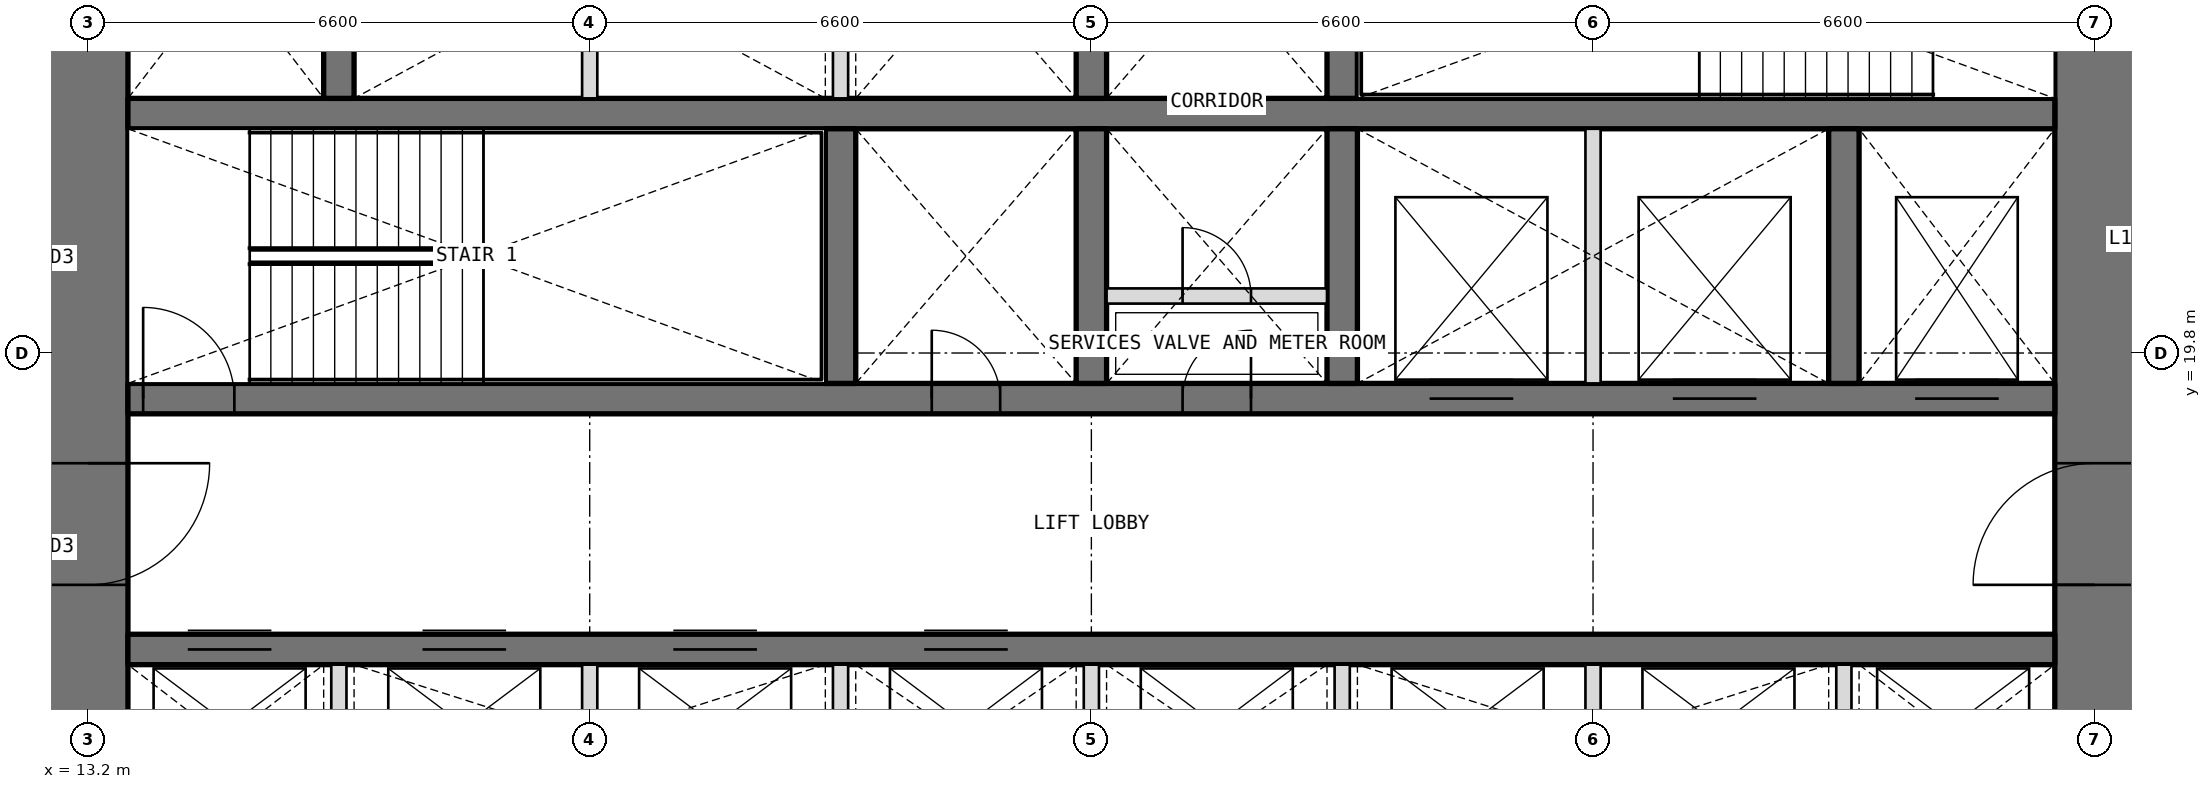
"""IFC4 building model, lengths in metres.
Left out: names, types, materials, properties, quantities, classifications, styles, units other than length and angle.
Written with IfcOpenShell. Run it as: python <this file> out.ifc"""

import sys

from ifc_helpers import new_model, si_unit, direction, frame, frame_2d, origin, place, context, subcontext, project, spatial, rectangle, extrude, element, fill, save


model = new_model("IFC4")
c1 = context("Model", 3, precision=1e-05, world=origin(), true_north=direction((0.0, 1.0)))
c2 = subcontext(c1, "Body", "Model", "MODEL_VIEW")
j1 = project(units=[si_unit("LENGTHUNIT", "METRE"), si_unit("PLANEANGLEUNIT", "RADIAN")], contexts=[c1])
p1 = place(None, origin())
s1 = spatial("IfcSite", under=j1, at=p1, CompositionType="ELEMENT")
p2 = place(p1, origin())
s2 = spatial("IfcBuilding", under=s1, at=p2, CompositionType="ELEMENT")
p3 = place(p2, frame((0.0, 0.0, 63.3)))
s3 = spatial("IfcBuildingStorey", under=s2, at=p3, CompositionType="ELEMENT", Elevation=63.3)
p4 = place(p3, frame((39.6, 13.725, 0.0), z_axis=(0.0, 0.0, 1.0), x_axis=(0.0, 1.0, 0.0)))
e1 = element("IfcWall", 1, at=p4, inside=s3, PredefinedType="SHEAR", context=c2, shape_type="SweptSolid", body=[
    extrude(rectangle(XDim=18.75, YDim=1.05, at=frame_2d((9.375, 0.0))), origin(), (0.0, 0.0, 1.0), 4.2),
])
p5 = place(p4, frame((3.025, 0.0, 0.0)))
e2 = element("IfcOpeningElement", 2, at=p5, cuts=e1, PredefinedType="OPENING", context=c2, shape_type="SweptSolid", body=[
    extrude(rectangle(XDim=1.6, YDim=2.1, at=frame_2d((0.8, 1.05))), frame((0.0, 0.535, 0.0), z_axis=(0.0, -1.0, 0.0), x_axis=(1.0, 0.0, 0.0)), (0.0, 0.0, 1.0), 1.07),
])
p6 = place(p4, frame((13.825, 0.0, 0.0)))
e3 = element("IfcOpeningElement", 3, at=p6, cuts=e1, PredefinedType="OPENING", context=c2, shape_type="SweptSolid", body=[
    extrude(rectangle(XDim=1.6, YDim=2.1, at=frame_2d((0.8, 1.05))), frame((0.0, 0.535, 0.0), z_axis=(0.0, -1.0, 0.0), x_axis=(1.0, 0.0, 0.0)), (0.0, 0.0, 1.0), 1.07),
])
p7 = place(p3, frame((13.2, 32.475, 0.0), z_axis=(0.0, 0.0, 1.0), x_axis=(0.0, -1.0, 0.0)))
e4 = element("IfcWall", 4, at=p7, inside=s3, PredefinedType="SHEAR", context=c2, shape_type="SweptSolid", body=[
    extrude(rectangle(XDim=18.75, YDim=1.05, at=frame_2d((9.375, 0.0))), origin(), (0.0, 0.0, 1.0), 4.2),
])
p8 = place(p7, frame((14.125, 0.0, 0.0)))
e5 = element("IfcOpeningElement", 5, at=p8, cuts=e4, PredefinedType="OPENING", context=c2, shape_type="SweptSolid", body=[
    extrude(rectangle(XDim=1.6, YDim=2.1, at=frame_2d((0.8, 1.05))), frame((0.0, 0.535, 0.0), z_axis=(0.0, -1.0, 0.0), x_axis=(1.0, 0.0, 0.0)), (0.0, 0.0, 1.0), 1.07),
])
p9 = place(p7, frame((3.325, 0.0, 0.0)))
e6 = element("IfcOpeningElement", 6, at=p9, cuts=e4, PredefinedType="OPENING", context=c2, shape_type="SweptSolid", body=[
    extrude(rectangle(XDim=1.6, YDim=2.1, at=frame_2d((0.8, 1.05))), frame((0.0, 0.535, 0.0), z_axis=(0.0, -1.0, 0.0), x_axis=(1.0, 0.0, 0.0)), (0.0, 0.0, 1.0), 1.07),
])
p10 = place(p3, frame((13.725, 15.9, 0.0), z_axis=(0.0, 0.0, 1.0), x_axis=(1.0, 0.0, 0.0)))
e7 = element("IfcWall", 7, at=p10, inside=s3, PredefinedType="SHEAR", context=c2, shape_type="SweptSolid", body=[
    extrude(rectangle(XDim=25.35, YDim=0.4, at=frame_2d((12.675, 0.0))), origin(), (0.0, 0.0, 1.0), 4.2),
])
p11 = place(p10, frame((0.788, 0.0, 0.0)))
e8 = element("IfcOpeningElement", 8, at=p11, cuts=e7, PredefinedType="OPENING", context=c2, shape_type="SweptSolid", body=[
    extrude(rectangle(XDim=1.1, YDim=2.1, at=frame_2d((0.55, 1.05))), frame((0.0, 0.21, 0.0), z_axis=(0.0, -1.0, 0.0), x_axis=(1.0, 0.0, 0.0)), (0.0, 0.0, 1.0), 0.42),
])
p12 = place(p10, frame((3.875, 0.0, 0.0)))
e9 = element("IfcOpeningElement", 9, at=p12, cuts=e7, PredefinedType="OPENING", context=c2, shape_type="SweptSolid", body=[
    extrude(rectangle(XDim=1.1, YDim=2.1, at=frame_2d((0.55, 1.05))), frame((0.0, 0.21, 0.0), z_axis=(0.0, -1.0, 0.0), x_axis=(1.0, 0.0, 0.0)), (0.0, 0.0, 1.0), 0.42),
])
p13 = place(p10, frame((7.175, 0.0, 0.0)))
e10 = element("IfcOpeningElement", 10, at=p13, cuts=e7, PredefinedType="OPENING", context=c2, shape_type="SweptSolid", body=[
    extrude(rectangle(XDim=1.1, YDim=2.1, at=frame_2d((0.55, 1.05))), frame((0.0, 0.21, 0.0), z_axis=(0.0, -1.0, 0.0), x_axis=(1.0, 0.0, 0.0)), (0.0, 0.0, 1.0), 0.42),
])
p14 = place(p10, frame((10.475, 0.0, 0.0)))
e11 = element("IfcOpeningElement", 11, at=p14, cuts=e7, PredefinedType="OPENING", context=c2, shape_type="SweptSolid", body=[
    extrude(rectangle(XDim=1.1, YDim=2.1, at=frame_2d((0.55, 1.05))), frame((0.0, 0.21, 0.0), z_axis=(0.0, -1.0, 0.0), x_axis=(1.0, 0.0, 0.0)), (0.0, 0.0, 1.0), 0.42),
])
p15 = place(p3, frame((13.725, 19.2, 0.0), z_axis=(0.0, 0.0, 1.0), x_axis=(1.0, 0.0, 0.0)))
e12 = element("IfcWall", 12, at=p15, inside=s3, PredefinedType="SHEAR", context=c2, shape_type="SweptSolid", body=[
    extrude(rectangle(XDim=25.35, YDim=0.4, at=frame_2d((12.675, 0.0))), origin(), (0.0, 0.0, 1.0), 4.2),
])
p16 = place(p15, frame((10.575, 0.0, 0.0)))
e13 = element("IfcOpeningElement", 13, at=p16, cuts=e12, PredefinedType="OPENING", context=c2, shape_type="SweptSolid", body=[
    extrude(rectangle(XDim=0.9, YDim=2.1, at=frame_2d((0.45, 1.05))), frame((0.0, 0.21, 0.0), z_axis=(0.0, -1.0, 0.0), x_axis=(1.0, 0.0, 0.0)), (0.0, 0.0, 1.0), 0.42),
])
p17 = place(p15, frame((13.875, 0.0, 0.0)))
e14 = element("IfcOpeningElement", 14, at=p17, cuts=e12, PredefinedType="OPENING", context=c2, shape_type="SweptSolid", body=[
    extrude(rectangle(XDim=0.9, YDim=2.1, at=frame_2d((0.45, 1.05))), frame((0.0, 0.21, 0.0), z_axis=(0.0, -1.0, 0.0), x_axis=(1.0, 0.0, 0.0)), (0.0, 0.0, 1.0), 0.42),
])
p18 = place(p15, frame((0.2, 0.0, 0.0)))
e15 = element("IfcOpeningElement", 15, at=p18, cuts=e12, PredefinedType="OPENING", context=c2, shape_type="SweptSolid", body=[
    extrude(rectangle(XDim=1.2, YDim=2.1, at=frame_2d((0.6, 1.05))), frame((0.0, 0.21, 0.0), z_axis=(0.0, -1.0, 0.0), x_axis=(1.0, 0.0, 0.0)), (0.0, 0.0, 1.0), 0.42),
])
p19 = place(p15, frame((23.512, 0.0, 0.0)))
e16 = element("IfcOpeningElement", 16, at=p19, cuts=e12, PredefinedType="OPENING", context=c2, shape_type="SweptSolid", body=[
    extrude(rectangle(XDim=1.1, YDim=2.1, at=frame_2d((0.55, 1.05))), frame((0.0, 0.21, 0.0), z_axis=(0.0, -1.0, 0.0), x_axis=(1.0, 0.0, 0.0)), (0.0, 0.0, 1.0), 0.42),
])
p20 = place(p15, frame((17.125, 0.0, 0.0)))
e17 = element("IfcOpeningElement", 17, at=p20, cuts=e12, PredefinedType="OPENING", context=c2, shape_type="SweptSolid", body=[
    extrude(rectangle(XDim=1.1, YDim=2.1, at=frame_2d((0.55, 1.05))), frame((0.0, 0.21, 0.0), z_axis=(0.0, -1.0, 0.0), x_axis=(1.0, 0.0, 0.0)), (0.0, 0.0, 1.0), 0.42),
])
p21 = place(p15, frame((20.325, 0.0, 0.0)))
e18 = element("IfcOpeningElement", 18, at=p21, cuts=e12, PredefinedType="OPENING", context=c2, shape_type="SweptSolid", body=[
    extrude(rectangle(XDim=1.1, YDim=2.1, at=frame_2d((0.55, 1.05))), frame((0.0, 0.21, 0.0), z_axis=(0.0, -1.0, 0.0), x_axis=(1.0, 0.0, 0.0)), (0.0, 0.0, 1.0), 0.42),
])
p22 = place(p3, frame((13.725, 22.95, 0.0), z_axis=(0.0, 0.0, 1.0), x_axis=(1.0, 0.0, 0.0)))
e19 = element("IfcWall", 19, at=p22, inside=s3, PredefinedType="SHEAR", context=c2, shape_type="SweptSolid", body=[
    extrude(rectangle(XDim=25.35, YDim=0.4, at=frame_2d((12.675, 0.0))), origin(), (0.0, 0.0, 1.0), 4.2),
])
for number, where, z_axis, x_axis in (
    (20, (23.1, 19.4, 0.0), (0.0, 0.0, 1.0), (0.0, 1.0, 0.0)),
    (21, (26.4, 19.4, 0.0), (0.0, 0.0, 1.0), (0.0, 1.0, 0.0)),
    (22, (29.7, 19.4, 0.0), (0.0, 0.0, 1.0), (0.0, 1.0, 0.0)),
    (23, (36.3, 19.4, 0.0), (0.0, 0.0, 1.0), (0.0, 1.0, 0.0)),
    (24, (16.5, 23.15, 0.0), (0.0, 0.0, 1.0), (0.0, 1.0, 0.0)),
    (25, (26.4, 23.15, 0.0), (0.0, 0.0, 1.0), (0.0, 1.0, 0.0)),
    (26, (29.7, 23.15, 0.0), (0.0, 0.0, 1.0), (0.0, 1.0, 0.0)),
):
    element("IfcWall", number, at=place(p3, frame(where, z_axis=z_axis, x_axis=x_axis)), inside=s3, PredefinedType="SHEAR", context=c2, shape_type="SweptSolid", body=[
        extrude(rectangle(XDim=3.35, YDim=0.4, at=frame_2d((1.675, 0.0))), origin(), (0.0, 0.0, 1.0), 4.2),
    ])
for number, where, z_axis, x_axis in (
    (27, (16.5, 13.725, 0.0), (0.0, 0.0, 1.0), (0.0, 1.0, 0.0)),
    (28, (19.8, 13.725, 0.0), (0.0, 0.0, 1.0), (0.0, 1.0, 0.0)),
    (29, (23.1, 13.725, 0.0), (0.0, 0.0, 1.0), (0.0, 1.0, 0.0)),
    (30, (26.4, 13.725, 0.0), (0.0, 0.0, 1.0), (0.0, 1.0, 0.0)),
    (31, (29.7, 13.725, 0.0), (0.0, 0.0, 1.0), (0.0, 1.0, 0.0)),
    (32, (33.0, 13.725, 0.0), (0.0, 0.0, 1.0), (0.0, 1.0, 0.0)),
    (33, (36.3, 13.725, 0.0), (0.0, 0.0, 1.0), (0.0, 1.0, 0.0)),
):
    element("IfcWall", number, at=place(p3, frame(where, z_axis=z_axis, x_axis=x_axis)), inside=s3, PredefinedType="PARTITIONING", context=c2, shape_type="SweptSolid", body=[
        extrude(rectangle(XDim=1.975, YDim=0.2, at=frame_2d((0.987, 0.0))), origin(), (0.0, 0.0, 1.0), 4.2),
    ])
for number, where, z_axis, x_axis in (
    (34, (33.0, 19.4, 0.0), (0.0, 0.0, 1.0), (0.0, 1.0, 0.0)),
    (35, (19.8, 23.15, 0.0), (0.0, 0.0, 1.0), (0.0, 1.0, 0.0)),
    (36, (23.1, 23.15, 0.0), (0.0, 0.0, 1.0), (0.0, 1.0, 0.0)),
):
    element("IfcWall", number, at=place(p3, frame(where, z_axis=z_axis, x_axis=x_axis)), inside=s3, PredefinedType="PARTITIONING", context=c2, shape_type="SweptSolid", body=[
        extrude(rectangle(XDim=3.35, YDim=0.2, at=frame_2d((1.675, 0.0))), origin(), (0.0, 0.0, 1.0), 4.2),
    ])
p23 = place(p3, frame((26.6, 20.55, 0.0), z_axis=(0.0, 0.0, 1.0), x_axis=(1.0, 0.0, 0.0)))
e37 = element("IfcWall", 37, at=p23, inside=s3, PredefinedType="PARTITIONING", context=c2, shape_type="SweptSolid", body=[
    extrude(rectangle(XDim=2.9, YDim=0.2, at=frame_2d((1.45, 0.0))), origin(), (0.0, 0.0, 1.0), 3.9),
])
p24 = place(p23, frame((1.0, 0.0, 0.0)))
e38 = element("IfcOpeningElement", 38, at=p24, cuts=e37, PredefinedType="OPENING", context=c2, shape_type="SweptSolid", body=[
    extrude(rectangle(XDim=0.9, YDim=2.1, at=frame_2d((0.45, 1.05))), frame((0.0, 0.11, 0.0), z_axis=(0.0, -1.0, 0.0), x_axis=(1.0, 0.0, 0.0)), (0.0, 0.0, 1.0), 0.22),
])
p25 = place(p16, origin())
e39 = element("IfcDoor", 39, at=p25, inside=s3, OperationType="SINGLE_SWING_LEFT", PredefinedType="DOOR", context=c2, shape_type="SweptSolid", body=[
    extrude(rectangle(XDim=0.9, YDim=2.1, at=frame_2d((0.45, 1.05))), frame((0.0, 0.025, 0.0), z_axis=(0.0, -1.0, 0.0), x_axis=(1.0, 0.0, 0.0)), (0.0, 0.0, 1.0), 0.05),
])
fill(e13, e39)
p26 = place(p17, origin())
e40 = element("IfcDoor", 40, at=p26, inside=s3, OperationType="SINGLE_SWING_RIGHT", PredefinedType="DOOR", context=c2, shape_type="SweptSolid", body=[
    extrude(rectangle(XDim=0.9, YDim=2.1, at=frame_2d((0.45, 1.05))), frame((0.0, 0.025, 0.0), z_axis=(0.0, -1.0, 0.0), x_axis=(1.0, 0.0, 0.0)), (0.0, 0.0, 1.0), 0.05),
])
fill(e14, e40)
p27 = place(p24, origin())
e41 = element("IfcDoor", 41, at=p27, inside=s3, OperationType="SINGLE_SWING_LEFT", PredefinedType="DOOR", context=c2, shape_type="SweptSolid", body=[
    extrude(rectangle(XDim=0.9, YDim=2.1, at=frame_2d((0.45, 1.05))), frame((0.0, 0.025, 0.0), z_axis=(0.0, -1.0, 0.0), x_axis=(1.0, 0.0, 0.0)), (0.0, 0.0, 1.0), 0.05),
])
fill(e38, e41)
p28 = place(p18, origin())
e42 = element("IfcDoor", 42, at=p28, inside=s3, OperationType="SINGLE_SWING_LEFT", PredefinedType="DOOR", context=c2, shape_type="SweptSolid", body=[
    extrude(rectangle(XDim=1.2, YDim=2.1, at=frame_2d((0.6, 1.05))), frame((0.0, 0.025, 0.0), z_axis=(0.0, -1.0, 0.0), x_axis=(1.0, 0.0, 0.0)), (0.0, 0.0, 1.0), 0.05),
])
fill(e15, e42)
p29 = place(p8, origin())
e43 = element("IfcDoor", 43, at=p29, inside=s3, OperationType="DOUBLE_DOOR_DOUBLE_SWING", PredefinedType="DOOR", context=c2, shape_type="SweptSolid", body=[
    extrude(rectangle(XDim=1.6, YDim=2.1, at=frame_2d((0.8, 1.05))), frame((0.0, 0.025, 0.0), z_axis=(0.0, -1.0, 0.0), x_axis=(1.0, 0.0, 0.0)), (0.0, 0.0, 1.0), 0.05),
])
fill(e5, e43)
p30 = place(p5, origin())
e44 = element("IfcDoor", 44, at=p30, inside=s3, OperationType="DOUBLE_DOOR_DOUBLE_SWING", PredefinedType="DOOR", context=c2, shape_type="SweptSolid", body=[
    extrude(rectangle(XDim=1.6, YDim=2.1, at=frame_2d((0.8, 1.05))), frame((0.0, 0.025, 0.0), z_axis=(0.0, -1.0, 0.0), x_axis=(1.0, 0.0, 0.0)), (0.0, 0.0, 1.0), 0.05),
])
fill(e2, e44)
p31 = place(p11, origin())
e45 = element("IfcDoor", 45, at=p31, inside=s3, OperationType="DOUBLE_DOOR_SLIDING", PredefinedType="DOOR", context=c2, shape_type="SweptSolid", body=[
    extrude(rectangle(XDim=1.1, YDim=2.1, at=frame_2d((0.55, 1.05))), frame((0.0, 0.025, 0.0), z_axis=(0.0, -1.0, 0.0), x_axis=(1.0, 0.0, 0.0)), (0.0, 0.0, 1.0), 0.05),
])
fill(e8, e45)
p32 = place(p12, origin())
e46 = element("IfcDoor", 46, at=p32, inside=s3, OperationType="DOUBLE_DOOR_SLIDING", PredefinedType="DOOR", context=c2, shape_type="SweptSolid", body=[
    extrude(rectangle(XDim=1.1, YDim=2.1, at=frame_2d((0.55, 1.05))), frame((0.0, 0.025, 0.0), z_axis=(0.0, -1.0, 0.0), x_axis=(1.0, 0.0, 0.0)), (0.0, 0.0, 1.0), 0.05),
])
fill(e9, e46)
p33 = place(p13, origin())
e47 = element("IfcDoor", 47, at=p33, inside=s3, OperationType="DOUBLE_DOOR_SLIDING", PredefinedType="DOOR", context=c2, shape_type="SweptSolid", body=[
    extrude(rectangle(XDim=1.1, YDim=2.1, at=frame_2d((0.55, 1.05))), frame((0.0, 0.025, 0.0), z_axis=(0.0, -1.0, 0.0), x_axis=(1.0, 0.0, 0.0)), (0.0, 0.0, 1.0), 0.05),
])
fill(e10, e47)
p34 = place(p14, origin())
e48 = element("IfcDoor", 48, at=p34, inside=s3, OperationType="DOUBLE_DOOR_SLIDING", PredefinedType="DOOR", context=c2, shape_type="SweptSolid", body=[
    extrude(rectangle(XDim=1.1, YDim=2.1, at=frame_2d((0.55, 1.05))), frame((0.0, 0.025, 0.0), z_axis=(0.0, -1.0, 0.0), x_axis=(1.0, 0.0, 0.0)), (0.0, 0.0, 1.0), 0.05),
])
fill(e11, e48)
p35 = place(p19, origin())
e49 = element("IfcDoor", 49, at=p35, inside=s3, OperationType="DOUBLE_DOOR_SLIDING", PredefinedType="DOOR", context=c2, shape_type="SweptSolid", body=[
    extrude(rectangle(XDim=1.1, YDim=2.1, at=frame_2d((0.55, 1.05))), frame((0.0, 0.025, 0.0), z_axis=(0.0, -1.0, 0.0), x_axis=(1.0, 0.0, 0.0)), (0.0, 0.0, 1.0), 0.05),
])
fill(e16, e49)
p36 = place(p20, origin())
e50 = element("IfcDoor", 50, at=p36, inside=s3, OperationType="DOUBLE_DOOR_SLIDING", PredefinedType="DOOR", context=c2, shape_type="SweptSolid", body=[
    extrude(rectangle(XDim=1.1, YDim=2.1, at=frame_2d((0.55, 1.05))), frame((0.0, 0.025, 0.0), z_axis=(0.0, -1.0, 0.0), x_axis=(1.0, 0.0, 0.0)), (0.0, 0.0, 1.0), 0.05),
])
fill(e17, e50)
p37 = place(p21, origin())
e51 = element("IfcDoor", 51, at=p37, inside=s3, OperationType="DOUBLE_DOOR_SLIDING", PredefinedType="DOOR", context=c2, shape_type="SweptSolid", body=[
    extrude(rectangle(XDim=1.1, YDim=2.1, at=frame_2d((0.55, 1.05))), frame((0.0, 0.025, 0.0), z_axis=(0.0, -1.0, 0.0), x_axis=(1.0, 0.0, 0.0)), (0.0, 0.0, 1.0), 0.05),
])
fill(e18, e51)
save(model, sys.argv[1])
